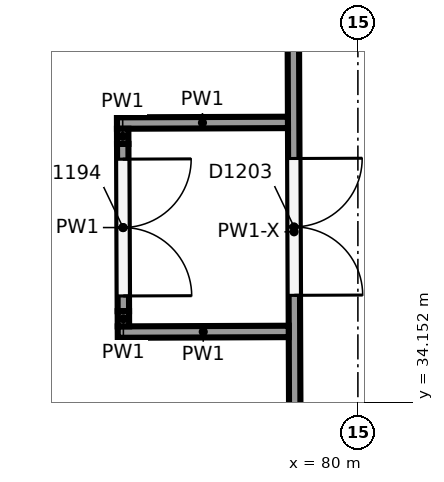
"""IFC4 building model, lengths in metres.
Left out: names, types, materials, properties, quantities, classifications, styles, units other than length and angle.
Written with IfcOpenShell. Run it as: python <this file> out.ifc"""

import sys

from ifc_helpers import new_model, si_unit, direction, frame, frame_2d, origin, place, context, subcontext, project, spatial, rectangle, extrude, element, fill, save


model = new_model("IFC4")
c1 = context("Model", 3, precision=1e-05, world=origin(), true_north=direction((0.0, 1.0)))
c2 = subcontext(c1, "Body", "Model", "MODEL_VIEW")
j1 = project(units=[si_unit("LENGTHUNIT", "METRE"), si_unit("PLANEANGLEUNIT", "RADIAN")], contexts=[c1])
p1 = place(None, origin())
s1 = spatial("IfcSite", under=j1, at=p1, CompositionType="ELEMENT")
p2 = place(p1, origin())
s2 = spatial("IfcBuilding", under=s1, at=p2, CompositionType="ELEMENT")
p3 = place(p2, frame((0.0, 0.0, 12.0)))
s3 = spatial("IfcBuildingStorey", under=s2, at=p3, CompositionType="ELEMENT", Elevation=12.0)
p4 = place(p3, frame((79.14, 41.81, 0.0), z_axis=(0.0, 0.0, 1.0), x_axis=(0.003787424647, -0.999992827682, 0.0)))
e1 = element("IfcWall", 1, at=p4, inside=s3, PredefinedType="PARTITIONING", context=c2, shape_type="SweptSolid", body=[
    extrude(rectangle(XDim=10.829, YDim=0.15, at=frame_2d((5.415, 0.0))), origin(), (0.0, 0.0, 1.0), 4.048),
])
p5 = place(p4, frame((4.45, 0.0, 0.0)))
e2 = element("IfcOpeningElement", 2, at=p5, cuts=e1, PredefinedType="OPENING", context=c2, shape_type="SweptSolid", body=[
    extrude(rectangle(XDim=1.8, YDim=2.1, at=frame_2d((0.9, 1.05))), frame((0.0, 0.085, 0.0), z_axis=(0.0, -1.0, 0.0), x_axis=(1.0, 0.0, 0.0)), (0.0, 0.0, 1.0), 0.17),
])
for number, where, z_axis, x_axis in (
    (3, (79.08, 37.835, 0.0), (0.0, 0.0, 1.0), (-1.0, -0.004, 0.0)),
    (4, (79.09, 35.085, 0.0), (0.0, 0.0, 1.0), (-1.0, -0.004, 0.0)),
):
    element("IfcWall", number, at=place(p3, frame(where, z_axis=z_axis, x_axis=x_axis)), inside=s3, PredefinedType="PARTITIONING", context=c2, shape_type="SweptSolid", body=[
        extrude(rectangle(XDim=2.25, YDim=0.15, at=frame_2d((1.125, 0.0))), origin(), (0.0, 0.0, 1.0), 5.65),
    ])
p6 = place(p3, frame((76.905, 37.751, 0.0), z_axis=(0.0, 0.0, 1.0), x_axis=(0.004883946635, -0.999988073462, 0.0)))
e5 = element("IfcWall", 5, at=p6, inside=s3, PredefinedType="PARTITIONING", context=c2, shape_type="SweptSolid", body=[
    extrude(rectangle(XDim=0.2, YDim=0.15, at=frame_2d((0.1, 0.0))), origin(), (0.0, 0.0, 1.0), 5.65),
])
p7 = place(p3, frame((76.906, 37.552, 0.0), z_axis=(0.0, 0.0, 1.0), x_axis=(0.003773139272, -0.999992881685, 0.0)))
e6 = element("IfcWall", 6, at=p7, inside=s3, PredefinedType="PARTITIONING", context=c2, shape_type="SweptSolid", body=[
    extrude(rectangle(XDim=2.2, YDim=0.15, at=frame_2d((1.1, 0.0))), origin(), (0.0, 0.0, 1.0), 5.65),
])
p8 = place(p7, frame((0.2, 0.0, 0.0)))
e7 = element("IfcOpeningElement", 7, at=p8, cuts=e6, PredefinedType="OPENING", context=c2, shape_type="SweptSolid", body=[
    extrude(rectangle(XDim=1.8, YDim=2.1, at=frame_2d((0.9, 1.05))), frame((0.0, 0.085, 0.0), z_axis=(0.0, -1.0, 0.0), x_axis=(1.0, 0.0, 0.0)), (0.0, 0.0, 1.0), 0.17),
])
p9 = place(p3, frame((76.914, 35.352, 0.0), z_axis=(0.0, 0.0, 1.0), x_axis=(0.003662979089, -0.99999329127, 0.0)))
e8 = element("IfcWall", 8, at=p9, inside=s3, PredefinedType="PARTITIONING", context=c2, shape_type="SweptSolid", body=[
    extrude(rectangle(XDim=0.2, YDim=0.15, at=frame_2d((0.1, 0.0))), origin(), (0.0, 0.0, 1.0), 5.65),
])
p10 = place(p5, origin())
e9 = element("IfcDoor", 9, at=p10, inside=s3, OperationType="DOUBLE_DOOR_SINGLE_SWING", PredefinedType="DOOR", context=c2, shape_type="SweptSolid", body=[
    extrude(rectangle(XDim=1.8, YDim=2.1, at=frame_2d((0.9, 1.05))), frame((0.0, 0.025, 0.0), z_axis=(0.0, -1.0, 0.0), x_axis=(1.0, 0.0, 0.0)), (0.0, 0.0, 1.0), 0.05),
])
fill(e2, e9)
p11 = place(p8, origin())
e10 = element("IfcDoor", 10, at=p11, inside=s3, OperationType="DOUBLE_DOOR_SINGLE_SWING", PredefinedType="DOOR", context=c2, shape_type="SweptSolid", body=[
    extrude(rectangle(XDim=1.8, YDim=2.1, at=frame_2d((0.9, 1.05))), frame((0.0, 0.025, 0.0), z_axis=(0.0, -1.0, 0.0), x_axis=(1.0, 0.0, 0.0)), (0.0, 0.0, 1.0), 0.05),
])
fill(e7, e10)
save(model, sys.argv[1])
